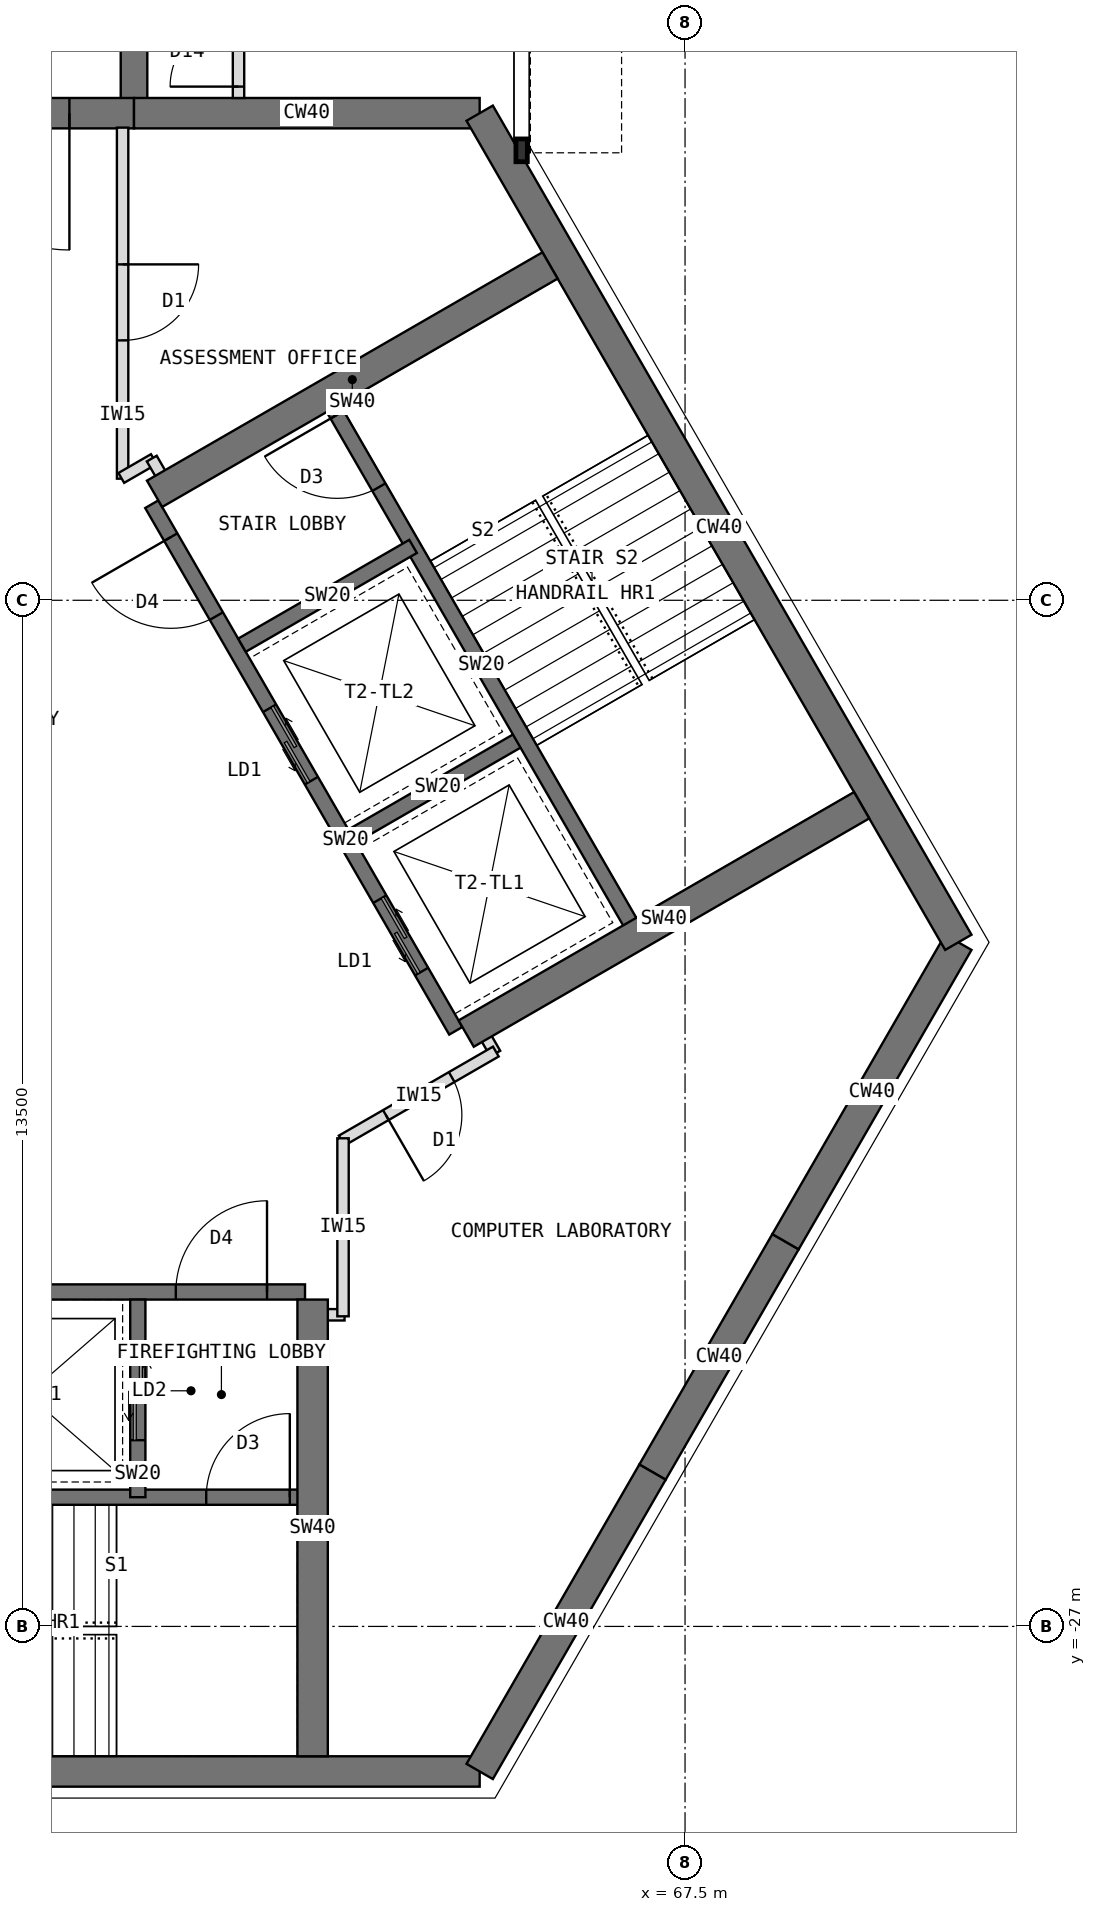
"""IFC4 building model, lengths in metres.
Left out: names, types, materials, properties, quantities, classifications, styles, units other than length and angle.
Written with IfcOpenShell. Run it as: python <this file> out.ifc"""

import sys

from ifc_helpers import new_model, si_unit, direction, frame, frame_2d, origin, place, context, subcontext, project, spatial, rectangle, extrude, element, fill, save


model = new_model("IFC4")
c1 = context("Model", 3, precision=1e-05, world=origin(), true_north=direction((0.0, 1.0)))
c2 = subcontext(c1, "Body", "Model", "MODEL_VIEW")
j1 = project(units=[si_unit("LENGTHUNIT", "METRE"), si_unit("PLANEANGLEUNIT", "RADIAN")], contexts=[c1])
p1 = place(None, origin())
s1 = spatial("IfcSite", under=j1, at=p1, CompositionType="ELEMENT")
p2 = place(p1, origin())
s2 = spatial("IfcBuilding", under=s1, at=p2, CompositionType="ELEMENT")
p3 = place(p2, frame((0.0, 0.0, 247.5)))
s3 = spatial("IfcBuildingStorey", under=s2, at=p3, CompositionType="ELEMENT", Elevation=247.5)
p4 = place(p3, frame((64.798, -7.092, 0.0), z_axis=(0.0, 0.0, 1.0), x_axis=(-1.0, 0.0, 0.0)))
e1 = element("IfcWall", 1, at=p4, inside=s3, PredefinedType="SHEAR", context=c2, shape_type="SweptSolid", body=[
    extrude(rectangle(XDim=4.548, YDim=0.4, at=frame_2d((2.274, 0.0))), origin(), (0.0, 0.0, 1.0), 4.0),
])
p5 = place(p3, frame((60.25, -7.092, 0.0), z_axis=(0.0, 0.0, 1.0), x_axis=(-1.0, 0.0, 0.0)))
e2 = element("IfcWall", 2, at=p5, inside=s3, PredefinedType="SHEAR", context=c2, shape_type="SweptSolid", body=[
    extrude(rectangle(XDim=3.5, YDim=0.4, at=frame_2d((1.75, 0.0))), origin(), (0.0, 0.0, 1.0), 4.0),
])
p6 = place(p5, frame((0.85, 0.0, 0.0)))
e3 = element("IfcOpeningElement", 3, at=p6, cuts=e2, PredefinedType="OPENING", context=c2, shape_type="SweptSolid", body=[
    extrude(rectangle(XDim=1.8, YDim=2.1, at=frame_2d((0.9, 1.05))), frame((0.0, 0.21, 0.0), z_axis=(0.0, -1.0, 0.0), x_axis=(1.0, 0.0, 0.0)), (0.0, 0.0, 1.0), 0.42),
])
p7 = place(p3, frame((52.202, -28.908, 0.0), z_axis=(0.0, 0.0, 1.0), x_axis=(1.0, 0.0, 0.0)))
e4 = element("IfcWall", 4, at=p7, inside=s3, PredefinedType="SHEAR", context=c2, shape_type="SweptSolid", body=[
    extrude(rectangle(XDim=12.596, YDim=0.4, at=frame_2d((6.298, 0.0))), origin(), (0.0, 0.0, 1.0), 4.0),
])
p8 = place(p3, frame((64.798, -28.908, 0.0), z_axis=(0.0, 0.0, 1.0), x_axis=(0.499984222037, 0.866034513004, 0.0)))
e5 = element("IfcWall", 5, at=p8, inside=s3, PredefinedType="SHEAR", context=c2, shape_type="SweptSolid", body=[
    extrude(rectangle(XDim=4.548, YDim=0.4, at=frame_2d((2.274, 0.0))), origin(), (0.0, 0.0, 1.0), 4.0),
])
p9 = place(p3, frame((67.072, -24.97, 0.0), z_axis=(0.0, 0.0, 1.0), x_axis=(0.500010275428, 0.866019471182, 0.0)))
e6 = element("IfcWall", 6, at=p9, inside=s3, PredefinedType="SHEAR", context=c2, shape_type="SweptSolid", body=[
    extrude(rectangle(XDim=3.5, YDim=0.4, at=frame_2d((1.75, 0.0))), origin(), (0.0, 0.0, 1.0), 4.0),
])
p10 = place(p3, frame((68.822, -21.939, 0.0), z_axis=(0.0, 0.0, 1.0), x_axis=(0.500024481964, 0.866011268655, 0.0)))
e7 = element("IfcWall", 7, at=p10, inside=s3, PredefinedType="SHEAR", context=c2, shape_type="SweptSolid", body=[
    extrude(rectangle(XDim=4.548, YDim=0.4, at=frame_2d((2.274, 0.0))), origin(), (0.0, 0.0, 1.0), 4.0),
])
p11 = place(p3, frame((71.096, -18.0, 0.0), z_axis=(0.0, 0.0, 1.0), x_axis=(-0.500005998175, 0.866021940709, 0.0)))
e8 = element("IfcWall", 8, at=p11, inside=s3, PredefinedType="SHEAR", context=c2, shape_type="SweptSolid", body=[
    extrude(rectangle(XDim=12.596, YDim=0.4, at=frame_2d((6.298, 0.0))), origin(), (0.0, 0.0, 1.0), 4.0),
])
p12 = place(p3, frame((60.25, -7.092, 0.0), z_axis=(0.0, 0.0, 1.0), x_axis=(0.0, 1.0, 0.0)))
e9 = element("IfcWall", 9, at=p12, inside=s3, PredefinedType="SHEAR", context=c2, shape_type="SweptSolid", body=[
    extrude(rectangle(XDim=2.592, YDim=0.35, at=frame_2d((1.296, 0.0))), origin(), (0.0, 0.0, 1.0), 4.0),
])
p13 = place(p3, frame((54.5, -22.6, 0.0), z_axis=(0.0, 0.0, 1.0), x_axis=(1.0, 0.0, 0.0)))
e10 = element("IfcWall", 10, at=p13, inside=s3, PredefinedType="SHEAR", context=c2, shape_type="SweptSolid", body=[
    extrude(rectangle(XDim=8.0, YDim=0.2, at=frame_2d((4.0, 0.0))), origin(), (0.0, 0.0, 1.0), 4.0),
])
p14 = place(p13, frame((6.3, 0.0, 0.0)))
e11 = element("IfcOpeningElement", 11, at=p14, cuts=e10, PredefinedType="OPENING", context=c2, shape_type="SweptSolid", body=[
    extrude(rectangle(XDim=1.2, YDim=2.1, at=frame_2d((0.6, 1.05))), frame((0.0, 0.11, 0.0), z_axis=(0.0, -1.0, 0.0), x_axis=(1.0, 0.0, 0.0)), (0.0, 0.0, 1.0), 0.22),
])
p15 = place(p13, frame((0.9, 0.0, 0.0)))
e12 = element("IfcOpeningElement", 12, at=p15, cuts=e10, PredefinedType="OPENING", context=c2, shape_type="SweptSolid", body=[
    extrude(rectangle(XDim=1.1, YDim=2.2, at=frame_2d((0.55, 1.1))), frame((0.0, 0.11, 0.0), z_axis=(0.0, -1.0, 0.0), x_axis=(1.0, 0.0, 0.0)), (0.0, 0.0, 1.0), 0.22),
])
p16 = place(p3, frame((60.3, -22.7, 0.0), z_axis=(0.0, 0.0, 1.0), x_axis=(0.0, -1.0, 0.0)))
e13 = element("IfcWall", 13, at=p16, inside=s3, PredefinedType="SHEAR", context=c2, shape_type="SweptSolid", body=[
    extrude(rectangle(XDim=2.6, YDim=0.2, at=frame_2d((1.3, 0.0))), origin(), (0.0, 0.0, 1.0), 4.0),
])
p17 = place(p16, frame((0.55, 0.0, 0.0)))
e14 = element("IfcOpeningElement", 14, at=p17, cuts=e13, PredefinedType="OPENING", context=c2, shape_type="SweptSolid", body=[
    extrude(rectangle(XDim=1.3, YDim=2.2, at=frame_2d((0.65, 1.1))), frame((0.0, 0.11, 0.0), z_axis=(0.0, -1.0, 0.0), x_axis=(1.0, 0.0, 0.0)), (0.0, 0.0, 1.0), 0.22),
])
p18 = place(p3, frame((54.5, -25.3, 0.0), z_axis=(0.0, 0.0, 1.0), x_axis=(1.0, 0.0, 0.0)))
e15 = element("IfcWall", 15, at=p18, inside=s3, PredefinedType="SHEAR", context=c2, shape_type="SweptSolid", body=[
    extrude(rectangle(XDim=8.0, YDim=0.2, at=frame_2d((4.0, 0.0))), origin(), (0.0, 0.0, 1.0), 4.0),
])
p19 = place(p18, frame((6.7, 0.0, 0.0)))
e16 = element("IfcOpeningElement", 16, at=p19, cuts=e15, PredefinedType="OPENING", context=c2, shape_type="SweptSolid", body=[
    extrude(rectangle(XDim=1.1, YDim=2.1, at=frame_2d((0.55, 1.05))), frame((0.0, 0.11, 0.0), z_axis=(0.0, -1.0, 0.0), x_axis=(1.0, 0.0, 0.0)), (0.0, 0.0, 1.0), 0.22),
])
p20 = place(p3, frame((62.6, -22.7, 0.0), z_axis=(0.0, 0.0, 1.0), x_axis=(0.0, -1.0, 0.0)))
e17 = element("IfcWall", 17, at=p20, inside=s3, PredefinedType="SHEAR", context=c2, shape_type="SweptSolid", body=[
    extrude(rectangle(XDim=6.008, YDim=0.4, at=frame_2d((3.004, 0.0))), origin(), (0.0, 0.0, 1.0), 4.0),
])
p21 = place(p3, frame((64.484, -19.164, 0.0), z_axis=(0.0, 0.0, 1.0), x_axis=(-0.49999894854, 0.866026010844, 0.0)))
e18 = element("IfcWall", 18, at=p21, inside=s3, PredefinedType="SHEAR", context=c2, shape_type="SweptSolid", body=[
    extrude(rectangle(XDim=8.0, YDim=0.2, at=frame_2d((4.0, 0.0))), origin(), (0.0, 0.0, 1.0), 4.0),
])
p22 = place(p21, frame((6.3, 0.0, 0.0)))
e19 = element("IfcOpeningElement", 19, at=p22, cuts=e18, PredefinedType="OPENING", context=c2, shape_type="SweptSolid", body=[
    extrude(rectangle(XDim=1.2, YDim=2.1, at=frame_2d((0.6, 1.05))), frame((0.0, 0.11, 0.0), z_axis=(0.0, -1.0, 0.0), x_axis=(1.0, 0.0, 0.0)), (0.0, 0.0, 1.0), 0.22),
])
p23 = place(p21, frame((0.9, 0.0, 0.0)))
e20 = element("IfcOpeningElement", 20, at=p23, cuts=e18, PredefinedType="OPENING", context=c2, shape_type="SweptSolid", body=[
    extrude(rectangle(XDim=1.1, YDim=2.2, at=frame_2d((0.55, 1.1))), frame((0.0, 0.11, 0.0), z_axis=(0.0, -1.0, 0.0), x_axis=(1.0, 0.0, 0.0)), (0.0, 0.0, 1.0), 0.22),
])
p24 = place(p21, frame((3.8, 0.0, 0.0)))
e21 = element("IfcOpeningElement", 21, at=p24, cuts=e18, PredefinedType="OPENING", context=c2, shape_type="SweptSolid", body=[
    extrude(rectangle(XDim=1.1, YDim=2.2, at=frame_2d((0.55, 1.1))), frame((0.0, 0.11, 0.0), z_axis=(0.0, -1.0, 0.0), x_axis=(1.0, 0.0, 0.0)), (0.0, 0.0, 1.0), 0.22),
])
p25 = place(p3, frame((63.12, -16.603, 0.0), z_axis=(0.0, 0.0, 1.0), x_axis=(0.866062058628, 0.499936506574, 0.0)))
e22 = element("IfcWall", 22, at=p25, inside=s3, PredefinedType="SHEAR", context=c2, shape_type="SweptSolid", body=[
    extrude(rectangle(XDim=2.6, YDim=0.2, at=frame_2d((1.3, 0.0))), origin(), (0.0, 0.0, 1.0), 4.0),
])
p26 = place(p3, frame((61.67, -14.091, 0.0), z_axis=(0.0, 0.0, 1.0), x_axis=(0.86603858612, 0.49997716683, 0.0)))
e23 = element("IfcWall", 23, at=p26, inside=s3, PredefinedType="SHEAR", context=c2, shape_type="SweptSolid", body=[
    extrude(rectangle(XDim=2.6, YDim=0.2, at=frame_2d((1.3, 0.0))), origin(), (0.0, 0.0, 1.0), 4.0),
])
p27 = place(p3, frame((66.822, -17.814, 0.0), z_axis=(0.0, 0.0, 1.0), x_axis=(-0.49999894854, 0.866026010844, 0.0)))
e24 = element("IfcWall", 24, at=p27, inside=s3, PredefinedType="SHEAR", context=c2, shape_type="SweptSolid", body=[
    extrude(rectangle(XDim=8.0, YDim=0.2, at=frame_2d((4.0, 0.0))), origin(), (0.0, 0.0, 1.0), 4.0),
])
p28 = place(p27, frame((6.7, 0.0, 0.0)))
e25 = element("IfcOpeningElement", 25, at=p28, cuts=e24, PredefinedType="OPENING", context=c2, shape_type="SweptSolid", body=[
    extrude(rectangle(XDim=1.1, YDim=2.1, at=frame_2d((0.55, 1.05))), frame((0.0, 0.11, 0.0), z_axis=(0.0, -1.0, 0.0), x_axis=(1.0, 0.0, 0.0)), (0.0, 0.0, 1.0), 0.22),
])
for number, where, z_axis, x_axis in (
    (26, (60.52, -12.099, 0.0), (0.0, 0.0, 1.0), (0.866, 0.5, 0.0)),
    (27, (64.62, -19.201, 0.0), (0.0, 0.0, 1.0), (0.866, 0.5, 0.0)),
):
    element("IfcWall", number, at=place(p3, frame(where, z_axis=z_axis, x_axis=x_axis)), inside=s3, PredefinedType="SHEAR", context=c2, shape_type="SweptSolid", body=[
        extrude(rectangle(XDim=6.008, YDim=0.4, at=frame_2d((3.004, 0.0))), origin(), (0.0, 0.0, 1.0), 4.0),
    ])
p29 = place(p3, frame((61.625, -6.892, 0.0), z_axis=(0.0, 0.0, 1.0), x_axis=(0.0, 1.0, 0.0)))
e28 = element("IfcWall", 28, at=p29, inside=s3, PredefinedType="PARTITIONING", context=c2, shape_type="SweptSolid", body=[
    extrude(rectangle(XDim=2.4, YDim=0.15, at=frame_2d((1.2, 0.0))), origin(), (0.0, 0.0, 1.0), 3.8),
])
p30 = place(p29, frame((0.15, 0.0, 0.0)))
e29 = element("IfcOpeningElement", 29, at=p30, cuts=e28, PredefinedType="OPENING", context=c2, shape_type="SweptSolid", body=[
    extrude(rectangle(XDim=0.9, YDim=2.1, at=frame_2d((0.45, 1.05))), frame((0.0, 0.085, 0.0), z_axis=(0.0, -1.0, 0.0), x_axis=(1.0, 0.0, 0.0)), (0.0, 0.0, 1.0), 0.17),
])
p31 = place(p3, frame((63.02, -22.9, 0.0), z_axis=(0.0, 0.0, 1.0), x_axis=(-1.0, 0.0, 0.0)))
e30 = element("IfcWall", 30, at=p31, inside=s3, PredefinedType="PARTITIONING", context=c2, shape_type="SweptSolid", body=[
    extrude(rectangle(XDim=0.43, YDim=0.15, at=frame_2d((0.215, 0.0))), origin(), (0.0, 0.0, 1.0), 3.8),
])
p32 = place(p3, frame((60.1, -7.282, 0.0), z_axis=(0.0, 0.0, 1.0), x_axis=(0.0, -1.0, 0.0)))
e31 = element("IfcWall", 31, at=p32, inside=s3, PredefinedType="PARTITIONING", context=c2, shape_type="SweptSolid", body=[
    extrude(rectangle(XDim=4.618, YDim=0.15, at=frame_2d((2.309, 0.0))), origin(), (0.0, 0.0, 1.0), 3.8),
])
p33 = place(p32, frame((1.799, 0.0, 0.0)))
e32 = element("IfcOpeningElement", 32, at=p33, cuts=e31, PredefinedType="OPENING", context=c2, shape_type="SweptSolid", body=[
    extrude(rectangle(XDim=1.0, YDim=2.1, at=frame_2d((0.5, 1.05))), frame((0.0, 0.085, 0.0), z_axis=(0.0, -1.0, 0.0), x_axis=(1.0, 0.0, 0.0)), (0.0, 0.0, 1.0), 0.17),
])
p34 = place(p3, frame((60.083, -11.89, 0.0), z_axis=(0.0, 0.0, 1.0), x_axis=(0.865831790172, 0.50033519877, 0.0)))
e33 = element("IfcWall", 33, at=p34, inside=s3, PredefinedType="PARTITIONING", context=c2, shape_type="SweptSolid", body=[
    extrude(rectangle(XDim=0.494, YDim=0.15, at=frame_2d((0.247, 0.0))), origin(), (0.0, 0.0, 1.0), 3.8),
])
for number, where, z_axis, x_axis in (
    (34, (60.483, -11.635, 0.0), (0.0, 0.0, 1.0), (0.5, -0.866, 0.0)),
    (35, (64.789, -19.092, 0.0), (0.0, 0.0, 1.0), (0.5, -0.866, 0.0)),
):
    element("IfcWall", number, at=place(p3, frame(where, z_axis=z_axis, x_axis=x_axis)), inside=s3, PredefinedType="PARTITIONING", context=c2, shape_type="SweptSolid", body=[
        extrude(rectangle(XDim=0.43, YDim=0.15, at=frame_2d((0.215, 0.0))), origin(), (0.0, 0.0, 1.0), 3.8),
    ])
p35 = place(p3, frame((65.011, -19.437, 0.0), z_axis=(0.0, 0.0, 1.0), x_axis=(-0.865982457891, -0.500074377092, 0.0)))
e36 = element("IfcWall", 36, at=p35, inside=s3, PredefinedType="PARTITIONING", context=c2, shape_type="SweptSolid", body=[
    extrude(rectangle(XDim=2.342, YDim=0.15, at=frame_2d((1.171, 0.0))), origin(), (0.0, 0.0, 1.0), 3.8),
])
p36 = place(p35, frame((0.671, 0.0, 0.0)))
e37 = element("IfcOpeningElement", 37, at=p36, cuts=e36, PredefinedType="OPENING", context=c2, shape_type="SweptSolid", body=[
    extrude(rectangle(XDim=1.0, YDim=2.1, at=frame_2d((0.5, 1.05))), frame((0.0, 0.085, 0.0), z_axis=(0.0, -1.0, 0.0), x_axis=(1.0, 0.0, 0.0)), (0.0, 0.0, 1.0), 0.17),
])
p37 = place(p3, frame((63.0, -20.578, 0.0), z_axis=(0.0, 0.0, 1.0), x_axis=(0.0, -1.0, 0.0)))
e38 = element("IfcWall", 38, at=p37, inside=s3, PredefinedType="PARTITIONING", context=c2, shape_type="SweptSolid", body=[
    extrude(rectangle(XDim=2.342, YDim=0.15, at=frame_2d((1.171, 0.0))), origin(), (0.0, 0.0, 1.0), 3.8),
])
p38 = place(p14, origin())
e39 = element("IfcDoor", 39, at=p38, inside=s3, OperationType="SINGLE_SWING_RIGHT", PredefinedType="DOOR", context=c2, shape_type="SweptSolid", body=[
    extrude(rectangle(XDim=1.2, YDim=2.1, at=frame_2d((0.6, 1.05))), frame((0.0, 0.025, 0.0), z_axis=(0.0, -1.0, 0.0), x_axis=(1.0, 0.0, 0.0)), (0.0, 0.0, 1.0), 0.05),
])
fill(e11, e39)
p39 = place(p17, origin())
e40 = element("IfcDoor", 40, at=p39, inside=s3, OperationType="DOUBLE_DOOR_SLIDING", PredefinedType="DOOR", context=c2, shape_type="SweptSolid", body=[
    extrude(rectangle(XDim=1.3, YDim=2.2, at=frame_2d((0.65, 1.1))), frame((0.0, 0.025, 0.0), z_axis=(0.0, -1.0, 0.0), x_axis=(1.0, 0.0, 0.0)), (0.0, 0.0, 1.0), 0.05),
])
fill(e14, e40)
p40 = place(p19, origin())
e41 = element("IfcDoor", 41, at=p40, inside=s3, OperationType="SINGLE_SWING_RIGHT", PredefinedType="DOOR", context=c2, shape_type="SweptSolid", body=[
    extrude(rectangle(XDim=1.1, YDim=2.1, at=frame_2d((0.55, 1.05))), frame((0.0, 0.025, 0.0), z_axis=(0.0, -1.0, 0.0), x_axis=(1.0, 0.0, 0.0)), (0.0, 0.0, 1.0), 0.05),
])
fill(e16, e41)
p41 = place(p22, origin())
e42 = element("IfcDoor", 42, at=p41, inside=s3, OperationType="SINGLE_SWING_RIGHT", PredefinedType="DOOR", context=c2, shape_type="SweptSolid", body=[
    extrude(rectangle(XDim=1.2, YDim=2.1, at=frame_2d((0.6, 1.05))), frame((0.0, 0.025, 0.0), z_axis=(0.0, -1.0, 0.0), x_axis=(1.0, 0.0, 0.0)), (0.0, 0.0, 1.0), 0.05),
])
fill(e19, e42)
p42 = place(p23, origin())
e43 = element("IfcDoor", 43, at=p42, inside=s3, OperationType="DOUBLE_DOOR_SLIDING", PredefinedType="DOOR", context=c2, shape_type="SweptSolid", body=[
    extrude(rectangle(XDim=1.1, YDim=2.2, at=frame_2d((0.55, 1.1))), frame((0.0, 0.025, 0.0), z_axis=(0.0, -1.0, 0.0), x_axis=(1.0, 0.0, 0.0)), (0.0, 0.0, 1.0), 0.05),
])
fill(e20, e43)
p43 = place(p24, origin())
e44 = element("IfcDoor", 44, at=p43, inside=s3, OperationType="DOUBLE_DOOR_SLIDING", PredefinedType="DOOR", context=c2, shape_type="SweptSolid", body=[
    extrude(rectangle(XDim=1.1, YDim=2.2, at=frame_2d((0.55, 1.1))), frame((0.0, 0.025, 0.0), z_axis=(0.0, -1.0, 0.0), x_axis=(1.0, 0.0, 0.0)), (0.0, 0.0, 1.0), 0.05),
])
fill(e21, e44)
p44 = place(p28, origin())
e45 = element("IfcDoor", 45, at=p44, inside=s3, OperationType="SINGLE_SWING_RIGHT", PredefinedType="DOOR", context=c2, shape_type="SweptSolid", body=[
    extrude(rectangle(XDim=1.1, YDim=2.1, at=frame_2d((0.55, 1.05))), frame((0.0, 0.025, 0.0), z_axis=(0.0, -1.0, 0.0), x_axis=(1.0, 0.0, 0.0)), (0.0, 0.0, 1.0), 0.05),
])
fill(e25, e45)
p45 = place(p6, origin())
e46 = element("IfcDoor", 46, at=p45, inside=s3, OperationType="DOUBLE_DOOR_DOUBLE_SWING", PredefinedType="DOOR", context=c2, shape_type="SweptSolid", body=[
    extrude(rectangle(XDim=1.8, YDim=2.1, at=frame_2d((0.9, 1.05))), frame((0.0, 0.025, 0.0), z_axis=(0.0, -1.0, 0.0), x_axis=(1.0, 0.0, 0.0)), (0.0, 0.0, 1.0), 0.05),
])
fill(e3, e46)
p46 = place(p30, origin())
e47 = element("IfcDoor", 47, at=p46, inside=s3, OperationType="SINGLE_SWING_LEFT", PredefinedType="DOOR", context=c2, shape_type="SweptSolid", body=[
    extrude(rectangle(XDim=0.9, YDim=2.1, at=frame_2d((0.45, 1.05))), frame((0.0, 0.025, 0.0), z_axis=(0.0, -1.0, 0.0), x_axis=(1.0, 0.0, 0.0)), (0.0, 0.0, 1.0), 0.05),
])
fill(e29, e47)
p47 = place(p36, origin())
e48 = element("IfcDoor", 48, at=p47, inside=s3, OperationType="SINGLE_SWING_RIGHT", PredefinedType="DOOR", context=c2, shape_type="SweptSolid", body=[
    extrude(rectangle(XDim=1.0, YDim=2.1, at=frame_2d((0.5, 1.05))), frame((0.0, 0.025, 0.0), z_axis=(0.0, -1.0, 0.0), x_axis=(1.0, 0.0, 0.0)), (0.0, 0.0, 1.0), 0.05),
])
fill(e37, e48)
p48 = place(p33, origin())
e49 = element("IfcDoor", 49, at=p48, inside=s3, OperationType="SINGLE_SWING_LEFT", PredefinedType="DOOR", context=c2, shape_type="SweptSolid", body=[
    extrude(rectangle(XDim=1.0, YDim=2.1, at=frame_2d((0.5, 1.05))), frame((0.0, 0.025, 0.0), z_axis=(0.0, -1.0, 0.0), x_axis=(1.0, 0.0, 0.0)), (0.0, 0.0, 1.0), 0.05),
])
fill(e32, e49)
save(model, sys.argv[1])
